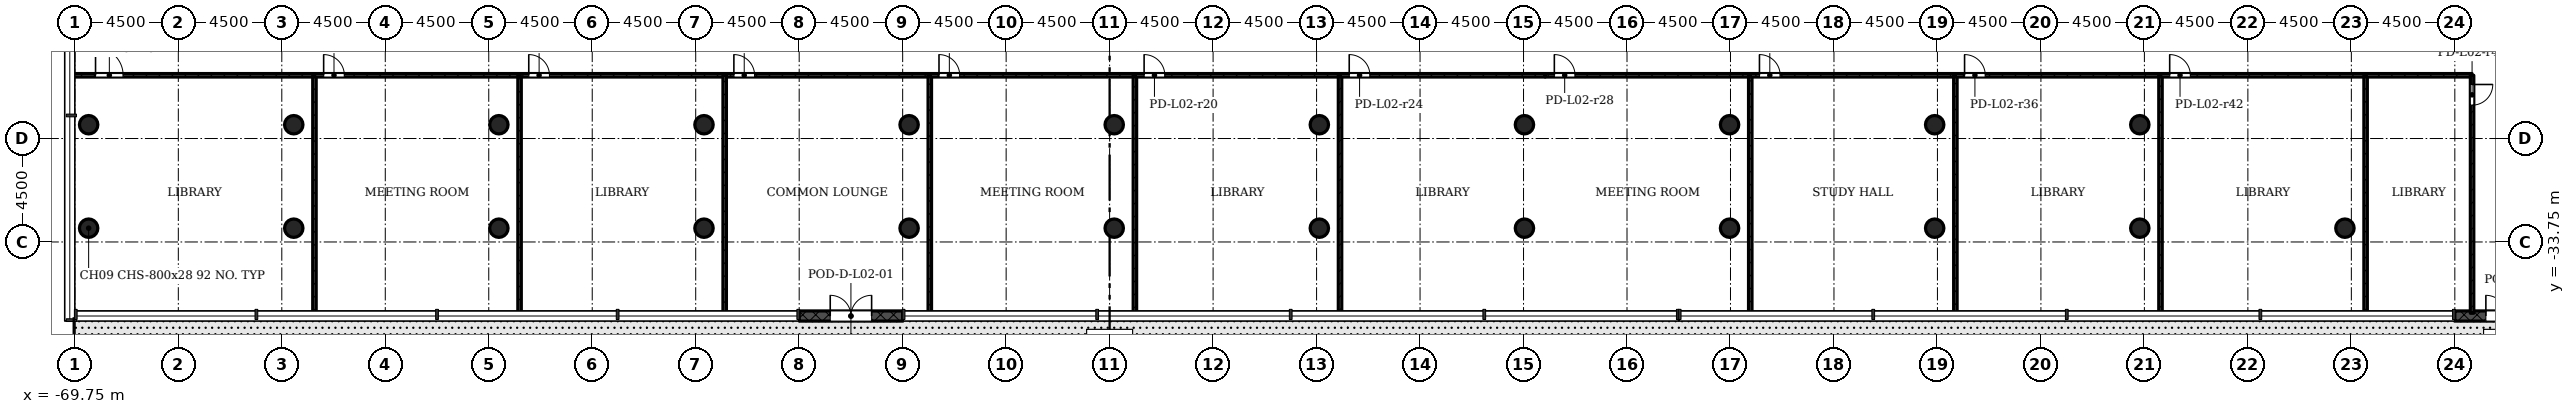
"""IFC4 building model, lengths in metres.
Left out: names, types, materials, properties, quantities, classifications, styles, units other than length and angle.
Written with IfcOpenShell. Run it as: python <this file> out.ifc"""

import sys

from ifc_helpers import new_model, si_unit, direction, frame, frame_2d, origin, origin_2d, place, context, subcontext, project, spatial, rectangle, hollow_circle, extrude, element, fill, save


model = new_model("IFC4")
c1 = context("Model", 3, precision=1e-05, world=origin(), true_north=direction((0.0, 1.0)))
c2 = subcontext(c1, "Body", "Model", "MODEL_VIEW")
j1 = project(units=[si_unit("LENGTHUNIT", "METRE"), si_unit("PLANEANGLEUNIT", "RADIAN")], contexts=[c1])
p1 = place(None, origin())
s1 = spatial("IfcSite", under=j1, at=p1, CompositionType="ELEMENT")
p2 = place(p1, origin())
s2 = spatial("IfcBuilding", under=s1, at=p2, CompositionType="ELEMENT")
p3 = place(p2, frame((0.0, 0.0, 11.0)))
s3 = spatial("IfcBuildingStorey", under=s2, at=p3, CompositionType="ELEMENT", Elevation=11.0)
for number, where, z_axis, x_axis in (
    (1, (-69.15, -33.15, 0.0), (0.0, 0.0, 1.0), (1.0, 0.0, 0.0)),
    (2, (-60.23, -33.15, 0.0), (0.0, 0.0, 1.0), (1.0, 0.0, 0.0)),
    (3, (-51.31, -33.15, 0.0), (0.0, 0.0, 1.0), (1.0, 0.0, 0.0)),
    (4, (-42.39, -33.15, 0.0), (0.0, 0.0, 1.0), (1.0, 0.0, 0.0)),
    (5, (-33.47, -33.15, 0.0), (0.0, 0.0, 1.0), (1.0, 0.0, 0.0)),
    (6, (-24.55, -33.15, 0.0), (0.0, 0.0, 1.0), (1.0, 0.0, 0.0)),
    (7, (-15.63, -33.15, 0.0), (0.0, 0.0, 1.0), (1.0, 0.0, 0.0)),
    (8, (-6.71, -33.15, 0.0), (0.0, 0.0, 1.0), (1.0, 0.0, 0.0)),
    (9, (2.21, -33.15, 0.0), (0.0, 0.0, 1.0), (1.0, 0.0, 0.0)),
    (10, (11.13, -33.15, 0.0), (0.0, 0.0, 1.0), (1.0, 0.0, 0.0)),
    (11, (20.05, -33.15, 0.0), (0.0, 0.0, 1.0), (1.0, 0.0, 0.0)),
    (12, (28.97, -33.15, 0.0), (0.0, 0.0, 1.0), (1.0, 0.0, 0.0)),
    (13, (-69.15, -28.65, 0.0), (0.0, 0.0, 1.0), (1.0, 0.0, 0.0)),
    (14, (-60.23, -28.65, 0.0), (0.0, 0.0, 1.0), (1.0, 0.0, 0.0)),
    (15, (-51.31, -28.65, 0.0), (0.0, 0.0, 1.0), (1.0, 0.0, 0.0)),
    (16, (-42.39, -28.65, 0.0), (0.0, 0.0, 1.0), (1.0, 0.0, 0.0)),
    (17, (-33.47, -28.65, 0.0), (0.0, 0.0, 1.0), (1.0, 0.0, 0.0)),
    (18, (-24.55, -28.65, 0.0), (0.0, 0.0, 1.0), (1.0, 0.0, 0.0)),
    (19, (-15.63, -28.65, 0.0), (0.0, 0.0, 1.0), (1.0, 0.0, 0.0)),
    (20, (-6.71, -28.65, 0.0), (0.0, 0.0, 1.0), (1.0, 0.0, 0.0)),
    (21, (2.21, -28.65, 0.0), (0.0, 0.0, 1.0), (1.0, 0.0, 0.0)),
    (22, (11.13, -28.65, 0.0), (0.0, 0.0, 1.0), (1.0, 0.0, 0.0)),
    (23, (20.05, -28.65, 0.0), (0.0, 0.0, 1.0), (1.0, 0.0, 0.0)),
):
    element("IfcColumn", number, at=place(p3, frame(where, z_axis=z_axis, x_axis=x_axis)), inside=s3, PredefinedType="COLUMN", context=c2, shape_type="SweptSolid", body=[
        extrude(hollow_circle(Radius=0.4, WallThickness=0.028, at=origin_2d()), origin(), (0.0, 0.0, 1.0), 4.5),
    ])
p4 = place(p3, frame((-38.25, -36.97, -0.02), z_axis=(0.0, 0.0, 1.0), x_axis=(1.0, 0.0, 0.0)))
e24 = element("IfcWall", 24, at=p4, inside=s3, PredefinedType="STANDARD", context=c2, shape_type="SweptSolid", body=[
    extrude(rectangle(XDim=4.5, YDim=0.44, at=frame_2d((2.25, 0.0))), origin(), (0.0, 0.0, 1.0), 4.22),
])
p5 = place(p4, frame((1.35, 0.0, 0.02)))
e25 = element("IfcOpeningElement", 25, at=p5, cuts=e24, PredefinedType="OPENING", context=c2, shape_type="SweptSolid", body=[
    extrude(rectangle(XDim=1.8, YDim=2.1, at=frame_2d((0.9, 1.05))), frame((0.0, 0.23, 0.0), z_axis=(0.0, -1.0, 0.0), x_axis=(1.0, 0.0, 0.0)), (0.0, 0.0, 1.0), 0.46),
])
p6 = place(p3, frame((33.75, -36.97, -0.02), z_axis=(0.0, 0.0, 1.0), x_axis=(1.0, 0.0, 0.0)))
e26 = element("IfcWall", 26, at=p6, inside=s3, PredefinedType="STANDARD", context=c2, shape_type="SweptSolid", body=[
    extrude(rectangle(XDim=4.5, YDim=0.44, at=frame_2d((2.25, 0.0))), origin(), (0.0, 0.0, 1.0), 4.22),
])
p7 = place(p6, frame((1.35, 0.0, 0.02)))
e27 = element("IfcOpeningElement", 27, at=p7, cuts=e26, PredefinedType="OPENING", context=c2, shape_type="SweptSolid", body=[
    extrude(rectangle(XDim=1.8, YDim=2.1, at=frame_2d((0.9, 1.05))), frame((0.0, 0.23, 0.0), z_axis=(0.0, -1.0, 0.0), x_axis=(1.0, 0.0, 0.0)), (0.0, 0.0, 1.0), 0.46),
])
p8 = place(p3, frame((-69.85, -26.5, 0.0), z_axis=(0.0, 0.0, 1.0), x_axis=(1.0, 0.0, 0.0)))
e28 = element("IfcWall", 28, at=p8, inside=s3, PredefinedType="PARTITIONING", context=c2, shape_type="SweptSolid", body=[
    extrude(rectangle(XDim=10.52, YDim=0.15, at=frame_2d((5.26, 0.0))), origin(), (0.0, 0.0, 1.0), 4.08),
])
p9 = place(p8, frame((1.0, 0.0, 0.0)))
e29 = element("IfcOpeningElement", 29, at=p9, cuts=e28, PredefinedType="OPENING", context=c2, shape_type="SweptSolid", body=[
    extrude(rectangle(XDim=1.2, YDim=2.1, at=frame_2d((0.6, 1.05))), frame((0.0, 0.085, 0.0), z_axis=(0.0, -1.0, 0.0), x_axis=(1.0, 0.0, 0.0)), (0.0, 0.0, 1.0), 0.17),
])
p10 = place(p3, frame((-59.33, -26.5, 0.0), z_axis=(0.0, 0.0, 1.0), x_axis=(0.0, -1.0, 0.0)))
e30 = element("IfcWall", 30, at=p10, inside=s3, PredefinedType="PARTITIONING", context=c2, shape_type="SweptSolid", body=[
    extrude(rectangle(XDim=10.35, YDim=0.15, at=frame_2d((5.175, 0.0))), origin(), (0.0, 0.0, 1.0), 4.08),
])
p11 = place(p3, frame((-59.33, -26.5, 0.0), z_axis=(0.0, 0.0, 1.0), x_axis=(1.0, 0.0, 0.0)))
e31 = element("IfcWall", 31, at=p11, inside=s3, PredefinedType="PARTITIONING", context=c2, shape_type="SweptSolid", body=[
    extrude(rectangle(XDim=8.92, YDim=0.15, at=frame_2d((4.46, 0.0))), origin(), (0.0, 0.0, 1.0), 4.08),
])
p12 = place(p11, frame((0.4, 0.0, 0.0)))
e32 = element("IfcOpeningElement", 32, at=p12, cuts=e31, PredefinedType="OPENING", context=c2, shape_type="SweptSolid", body=[
    extrude(rectangle(XDim=0.9, YDim=2.1, at=frame_2d((0.45, 1.05))), frame((0.0, 0.085, 0.0), z_axis=(0.0, -1.0, 0.0), x_axis=(1.0, 0.0, 0.0)), (0.0, 0.0, 1.0), 0.17),
])
p13 = place(p3, frame((-50.41, -26.5, 0.0), z_axis=(0.0, 0.0, 1.0), x_axis=(0.0, -1.0, 0.0)))
e33 = element("IfcWall", 33, at=p13, inside=s3, PredefinedType="PARTITIONING", context=c2, shape_type="SweptSolid", body=[
    extrude(rectangle(XDim=10.35, YDim=0.15, at=frame_2d((5.175, 0.0))), origin(), (0.0, 0.0, 1.0), 4.08),
])
p14 = place(p3, frame((-50.41, -26.5, 0.0), z_axis=(0.0, 0.0, 1.0), x_axis=(1.0, 0.0, 0.0)))
e34 = element("IfcWall", 34, at=p14, inside=s3, PredefinedType="PARTITIONING", context=c2, shape_type="SweptSolid", body=[
    extrude(rectangle(XDim=8.92, YDim=0.15, at=frame_2d((4.46, 0.0))), origin(), (0.0, 0.0, 1.0), 4.08),
])
p15 = place(p14, frame((0.4, 0.0, 0.0)))
e35 = element("IfcOpeningElement", 35, at=p15, cuts=e34, PredefinedType="OPENING", context=c2, shape_type="SweptSolid", body=[
    extrude(rectangle(XDim=0.9, YDim=2.1, at=frame_2d((0.45, 1.05))), frame((0.0, 0.085, 0.0), z_axis=(0.0, -1.0, 0.0), x_axis=(1.0, 0.0, 0.0)), (0.0, 0.0, 1.0), 0.17),
])
p16 = place(p3, frame((-41.49, -26.5, 0.0), z_axis=(0.0, 0.0, 1.0), x_axis=(1.0, 0.0, 0.0)))
e36 = element("IfcWall", 36, at=p16, inside=s3, PredefinedType="PARTITIONING", context=c2, shape_type="SweptSolid", body=[
    extrude(rectangle(XDim=8.92, YDim=0.15, at=frame_2d((4.46, 0.0))), origin(), (0.0, 0.0, 1.0), 4.08),
])
p17 = place(p16, frame((0.4, 0.0, 0.0)))
e37 = element("IfcOpeningElement", 37, at=p17, cuts=e36, PredefinedType="OPENING", context=c2, shape_type="SweptSolid", body=[
    extrude(rectangle(XDim=0.9, YDim=2.1, at=frame_2d((0.45, 1.05))), frame((0.0, 0.085, 0.0), z_axis=(0.0, -1.0, 0.0), x_axis=(1.0, 0.0, 0.0)), (0.0, 0.0, 1.0), 0.17),
])
for number, where, z_axis, x_axis in (
    (38, (-41.49, -36.85, 0.0), (0.0, 0.0, 1.0), (0.0, 1.0, 0.0)),
    (39, (-32.57, -26.5, 0.0), (0.0, 0.0, 1.0), (0.0, -1.0, 0.0)),
):
    element("IfcWall", number, at=place(p3, frame(where, z_axis=z_axis, x_axis=x_axis)), inside=s3, PredefinedType="PARTITIONING", context=c2, shape_type="SweptSolid", body=[
        extrude(rectangle(XDim=10.35, YDim=0.15, at=frame_2d((5.175, 0.0))), origin(), (0.0, 0.0, 1.0), 4.08),
    ])
p18 = place(p3, frame((-32.57, -26.5, 0.0), z_axis=(0.0, 0.0, 1.0), x_axis=(1.0, 0.0, 0.0)))
e40 = element("IfcWall", 40, at=p18, inside=s3, PredefinedType="PARTITIONING", context=c2, shape_type="SweptSolid", body=[
    extrude(rectangle(XDim=8.92, YDim=0.15, at=frame_2d((4.46, 0.0))), origin(), (0.0, 0.0, 1.0), 4.08),
])
p19 = place(p18, frame((0.4, 0.0, 0.0)))
e41 = element("IfcOpeningElement", 41, at=p19, cuts=e40, PredefinedType="OPENING", context=c2, shape_type="SweptSolid", body=[
    extrude(rectangle(XDim=0.9, YDim=2.1, at=frame_2d((0.45, 1.05))), frame((0.0, 0.085, 0.0), z_axis=(0.0, -1.0, 0.0), x_axis=(1.0, 0.0, 0.0)), (0.0, 0.0, 1.0), 0.17),
])
p20 = place(p3, frame((-23.65, -26.5, 0.0), z_axis=(0.0, 0.0, 1.0), x_axis=(0.0, -1.0, 0.0)))
e42 = element("IfcWall", 42, at=p20, inside=s3, PredefinedType="PARTITIONING", context=c2, shape_type="SweptSolid", body=[
    extrude(rectangle(XDim=10.35, YDim=0.15, at=frame_2d((5.175, 0.0))), origin(), (0.0, 0.0, 1.0), 4.08),
])
p21 = place(p3, frame((-23.65, -26.5, 0.0), z_axis=(0.0, 0.0, 1.0), x_axis=(1.0, 0.0, 0.0)))
e43 = element("IfcWall", 43, at=p21, inside=s3, PredefinedType="PARTITIONING", context=c2, shape_type="SweptSolid", body=[
    extrude(rectangle(XDim=8.92, YDim=0.15, at=frame_2d((4.46, 0.0))), origin(), (0.0, 0.0, 1.0), 4.08),
])
p22 = place(p21, frame((0.4, 0.0, 0.0)))
e44 = element("IfcOpeningElement", 44, at=p22, cuts=e43, PredefinedType="OPENING", context=c2, shape_type="SweptSolid", body=[
    extrude(rectangle(XDim=0.9, YDim=2.1, at=frame_2d((0.45, 1.05))), frame((0.0, 0.085, 0.0), z_axis=(0.0, -1.0, 0.0), x_axis=(1.0, 0.0, 0.0)), (0.0, 0.0, 1.0), 0.17),
])
p23 = place(p3, frame((-14.73, -26.5, 0.0), z_axis=(0.0, 0.0, 1.0), x_axis=(0.0, -1.0, 0.0)))
e45 = element("IfcWall", 45, at=p23, inside=s3, PredefinedType="PARTITIONING", context=c2, shape_type="SweptSolid", body=[
    extrude(rectangle(XDim=10.35, YDim=0.15, at=frame_2d((5.175, 0.0))), origin(), (0.0, 0.0, 1.0), 4.08),
])
p24 = place(p3, frame((-14.73, -26.5, 0.0), z_axis=(0.0, 0.0, 1.0), x_axis=(1.0, 0.0, 0.0)))
e46 = element("IfcWall", 46, at=p24, inside=s3, PredefinedType="PARTITIONING", context=c2, shape_type="SweptSolid", body=[
    extrude(rectangle(XDim=8.92, YDim=0.15, at=frame_2d((4.46, 0.0))), origin(), (0.0, 0.0, 1.0), 4.08),
])
p25 = place(p24, frame((0.4, 0.0, 0.0)))
e47 = element("IfcOpeningElement", 47, at=p25, cuts=e46, PredefinedType="OPENING", context=c2, shape_type="SweptSolid", body=[
    extrude(rectangle(XDim=0.9, YDim=2.1, at=frame_2d((0.45, 1.05))), frame((0.0, 0.085, 0.0), z_axis=(0.0, -1.0, 0.0), x_axis=(1.0, 0.0, 0.0)), (0.0, 0.0, 1.0), 0.17),
])
p26 = place(p3, frame((-5.81, -26.5, 0.0), z_axis=(0.0, 0.0, 1.0), x_axis=(1.0, 0.0, 0.0)))
e48 = element("IfcWall", 48, at=p26, inside=s3, PredefinedType="PARTITIONING", context=c2, shape_type="SweptSolid", body=[
    extrude(rectangle(XDim=8.92, YDim=0.15, at=frame_2d((4.46, 0.0))), origin(), (0.0, 0.0, 1.0), 4.08),
])
p27 = place(p26, frame((0.4, 0.0, 0.0)))
e49 = element("IfcOpeningElement", 49, at=p27, cuts=e48, PredefinedType="OPENING", context=c2, shape_type="SweptSolid", body=[
    extrude(rectangle(XDim=0.9, YDim=2.1, at=frame_2d((0.45, 1.05))), frame((0.0, 0.085, 0.0), z_axis=(0.0, -1.0, 0.0), x_axis=(1.0, 0.0, 0.0)), (0.0, 0.0, 1.0), 0.17),
])
p28 = place(p3, frame((3.11, -26.5, 0.0), z_axis=(0.0, 0.0, 1.0), x_axis=(0.0, -1.0, 0.0)))
e50 = element("IfcWall", 50, at=p28, inside=s3, PredefinedType="PARTITIONING", context=c2, shape_type="SweptSolid", body=[
    extrude(rectangle(XDim=10.35, YDim=0.15, at=frame_2d((5.175, 0.0))), origin(), (0.0, 0.0, 1.0), 4.08),
])
p29 = place(p3, frame((3.11, -26.5, 0.0), z_axis=(0.0, 0.0, 1.0), x_axis=(1.0, 0.0, 0.0)))
e51 = element("IfcWall", 51, at=p29, inside=s3, PredefinedType="PARTITIONING", context=c2, shape_type="SweptSolid", body=[
    extrude(rectangle(XDim=8.92, YDim=0.15, at=frame_2d((4.46, 0.0))), origin(), (0.0, 0.0, 1.0), 4.08),
])
p30 = place(p29, frame((0.4, 0.0, 0.0)))
e52 = element("IfcOpeningElement", 52, at=p30, cuts=e51, PredefinedType="OPENING", context=c2, shape_type="SweptSolid", body=[
    extrude(rectangle(XDim=0.9, YDim=2.1, at=frame_2d((0.45, 1.05))), frame((0.0, 0.085, 0.0), z_axis=(0.0, -1.0, 0.0), x_axis=(1.0, 0.0, 0.0)), (0.0, 0.0, 1.0), 0.17),
])
p31 = place(p3, frame((12.03, -26.5, 0.0), z_axis=(0.0, 0.0, 1.0), x_axis=(0.0, -1.0, 0.0)))
e53 = element("IfcWall", 53, at=p31, inside=s3, PredefinedType="PARTITIONING", context=c2, shape_type="SweptSolid", body=[
    extrude(rectangle(XDim=10.35, YDim=0.15, at=frame_2d((5.175, 0.0))), origin(), (0.0, 0.0, 1.0), 4.08),
])
p32 = place(p3, frame((12.03, -26.5, 0.0), z_axis=(0.0, 0.0, 1.0), x_axis=(1.0, 0.0, 0.0)))
e54 = element("IfcWall", 54, at=p32, inside=s3, PredefinedType="PARTITIONING", context=c2, shape_type="SweptSolid", body=[
    extrude(rectangle(XDim=8.92, YDim=0.15, at=frame_2d((4.46, 0.0))), origin(), (0.0, 0.0, 1.0), 4.08),
])
p33 = place(p32, frame((0.4, 0.0, 0.0)))
e55 = element("IfcOpeningElement", 55, at=p33, cuts=e54, PredefinedType="OPENING", context=c2, shape_type="SweptSolid", body=[
    extrude(rectangle(XDim=0.9, YDim=2.1, at=frame_2d((0.45, 1.05))), frame((0.0, 0.085, 0.0), z_axis=(0.0, -1.0, 0.0), x_axis=(1.0, 0.0, 0.0)), (0.0, 0.0, 1.0), 0.17),
])
p34 = place(p3, frame((20.95, -26.5, 0.0), z_axis=(0.0, 0.0, 1.0), x_axis=(0.0, -1.0, 0.0)))
e56 = element("IfcWall", 56, at=p34, inside=s3, PredefinedType="PARTITIONING", context=c2, shape_type="SweptSolid", body=[
    extrude(rectangle(XDim=10.35, YDim=0.15, at=frame_2d((5.175, 0.0))), origin(), (0.0, 0.0, 1.0), 4.08),
])
p35 = place(p3, frame((20.95, -26.5, 0.0), z_axis=(0.0, 0.0, 1.0), x_axis=(1.0, 0.0, 0.0)))
e57 = element("IfcWall", 57, at=p35, inside=s3, PredefinedType="PARTITIONING", context=c2, shape_type="SweptSolid", body=[
    extrude(rectangle(XDim=8.92, YDim=0.15, at=frame_2d((4.46, 0.0))), origin(), (0.0, 0.0, 1.0), 4.08),
])
p36 = place(p35, frame((0.4, 0.0, 0.0)))
e58 = element("IfcOpeningElement", 58, at=p36, cuts=e57, PredefinedType="OPENING", context=c2, shape_type="SweptSolid", body=[
    extrude(rectangle(XDim=0.9, YDim=2.1, at=frame_2d((0.45, 1.05))), frame((0.0, 0.085, 0.0), z_axis=(0.0, -1.0, 0.0), x_axis=(1.0, 0.0, 0.0)), (0.0, 0.0, 1.0), 0.17),
])
p37 = place(p3, frame((29.87, -26.5, 0.0), z_axis=(0.0, 0.0, 1.0), x_axis=(0.0, -1.0, 0.0)))
e59 = element("IfcWall", 59, at=p37, inside=s3, PredefinedType="PARTITIONING", context=c2, shape_type="SweptSolid", body=[
    extrude(rectangle(XDim=10.35, YDim=0.15, at=frame_2d((5.175, 0.0))), origin(), (0.0, 0.0, 1.0), 4.08),
])
p38 = place(p3, frame((29.87, -26.5, 0.0), z_axis=(0.0, 0.0, 1.0), x_axis=(1.0, 0.0, 0.0)))
e60 = element("IfcWall", 60, at=p38, inside=s3, PredefinedType="PARTITIONING", context=c2, shape_type="SweptSolid", body=[
    extrude(rectangle(XDim=4.63, YDim=0.15, at=frame_2d((2.315, 0.0))), origin(), (0.0, 0.0, 1.0), 4.08),
])
p39 = place(p3, frame((34.5, -26.5, 0.0), z_axis=(0.0, 0.0, 1.0), x_axis=(0.0, -1.0, 0.0)))
e61 = element("IfcWall", 61, at=p39, inside=s3, PredefinedType="PARTITIONING", context=c2, shape_type="SweptSolid", body=[
    extrude(rectangle(XDim=10.35, YDim=0.15, at=frame_2d((5.175, 0.0))), origin(), (0.0, 0.0, 1.0), 4.08),
])
p40 = place(p39, frame((0.4, 0.0, 0.0)))
e62 = element("IfcOpeningElement", 62, at=p40, cuts=e61, PredefinedType="OPENING", context=c2, shape_type="SweptSolid", body=[
    extrude(rectangle(XDim=0.9, YDim=2.1, at=frame_2d((0.45, 1.05))), frame((0.0, 0.085, 0.0), z_axis=(0.0, -1.0, 0.0), x_axis=(1.0, 0.0, 0.0)), (0.0, 0.0, 1.0), 0.17),
])
p41 = place(p5, origin())
e63 = element("IfcDoor", 63, at=p41, inside=s3, OperationType="DOUBLE_DOOR_SINGLE_SWING", PredefinedType="DOOR", context=c2, shape_type="SweptSolid", body=[
    extrude(rectangle(XDim=1.8, YDim=2.1, at=frame_2d((0.9, 1.05))), frame((0.0, 0.025, 0.0), z_axis=(0.0, -1.0, 0.0), x_axis=(1.0, 0.0, 0.0)), (0.0, 0.0, 1.0), 0.05),
])
fill(e25, e63)
p42 = place(p7, origin())
e64 = element("IfcDoor", 64, at=p42, inside=s3, OperationType="DOUBLE_DOOR_SINGLE_SWING", PredefinedType="DOOR", context=c2, shape_type="SweptSolid", body=[
    extrude(rectangle(XDim=1.8, YDim=2.1, at=frame_2d((0.9, 1.05))), frame((0.0, 0.025, 0.0), z_axis=(0.0, -1.0, 0.0), x_axis=(1.0, 0.0, 0.0)), (0.0, 0.0, 1.0), 0.05),
])
fill(e27, e64)
p43 = place(p9, origin())
e65 = element("IfcDoor", 65, at=p43, inside=s3, OperationType="SINGLE_SWING_RIGHT", PredefinedType="DOOR", context=c2, shape_type="SweptSolid", body=[
    extrude(rectangle(XDim=1.2, YDim=2.1, at=frame_2d((0.6, 1.05))), frame((0.0, 0.025, 0.0), z_axis=(0.0, -1.0, 0.0), x_axis=(1.0, 0.0, 0.0)), (0.0, 0.0, 1.0), 0.05),
])
fill(e29, e65)
p44 = place(p12, origin())
e66 = element("IfcDoor", 66, at=p44, inside=s3, OperationType="SINGLE_SWING_RIGHT", PredefinedType="DOOR", context=c2, shape_type="SweptSolid", body=[
    extrude(rectangle(XDim=0.9, YDim=2.1, at=frame_2d((0.45, 1.05))), frame((0.0, 0.025, 0.0), z_axis=(0.0, -1.0, 0.0), x_axis=(1.0, 0.0, 0.0)), (0.0, 0.0, 1.0), 0.05),
])
fill(e32, e66)
p45 = place(p15, origin())
e67 = element("IfcDoor", 67, at=p45, inside=s3, OperationType="SINGLE_SWING_RIGHT", PredefinedType="DOOR", context=c2, shape_type="SweptSolid", body=[
    extrude(rectangle(XDim=0.9, YDim=2.1, at=frame_2d((0.45, 1.05))), frame((0.0, 0.025, 0.0), z_axis=(0.0, -1.0, 0.0), x_axis=(1.0, 0.0, 0.0)), (0.0, 0.0, 1.0), 0.05),
])
fill(e35, e67)
p46 = place(p17, origin())
e68 = element("IfcDoor", 68, at=p46, inside=s3, OperationType="SINGLE_SWING_RIGHT", PredefinedType="DOOR", context=c2, shape_type="SweptSolid", body=[
    extrude(rectangle(XDim=0.9, YDim=2.1, at=frame_2d((0.45, 1.05))), frame((0.0, 0.025, 0.0), z_axis=(0.0, -1.0, 0.0), x_axis=(1.0, 0.0, 0.0)), (0.0, 0.0, 1.0), 0.05),
])
fill(e37, e68)
p47 = place(p19, origin())
e69 = element("IfcDoor", 69, at=p47, inside=s3, OperationType="SINGLE_SWING_RIGHT", PredefinedType="DOOR", context=c2, shape_type="SweptSolid", body=[
    extrude(rectangle(XDim=0.9, YDim=2.1, at=frame_2d((0.45, 1.05))), frame((0.0, 0.025, 0.0), z_axis=(0.0, -1.0, 0.0), x_axis=(1.0, 0.0, 0.0)), (0.0, 0.0, 1.0), 0.05),
])
fill(e41, e69)
p48 = place(p22, origin())
e70 = element("IfcDoor", 70, at=p48, inside=s3, OperationType="SINGLE_SWING_RIGHT", PredefinedType="DOOR", context=c2, shape_type="SweptSolid", body=[
    extrude(rectangle(XDim=0.9, YDim=2.1, at=frame_2d((0.45, 1.05))), frame((0.0, 0.025, 0.0), z_axis=(0.0, -1.0, 0.0), x_axis=(1.0, 0.0, 0.0)), (0.0, 0.0, 1.0), 0.05),
])
fill(e44, e70)
p49 = place(p25, origin())
e71 = element("IfcDoor", 71, at=p49, inside=s3, OperationType="SINGLE_SWING_RIGHT", PredefinedType="DOOR", context=c2, shape_type="SweptSolid", body=[
    extrude(rectangle(XDim=0.9, YDim=2.1, at=frame_2d((0.45, 1.05))), frame((0.0, 0.025, 0.0), z_axis=(0.0, -1.0, 0.0), x_axis=(1.0, 0.0, 0.0)), (0.0, 0.0, 1.0), 0.05),
])
fill(e47, e71)
p50 = place(p27, origin())
e72 = element("IfcDoor", 72, at=p50, inside=s3, OperationType="SINGLE_SWING_RIGHT", PredefinedType="DOOR", context=c2, shape_type="SweptSolid", body=[
    extrude(rectangle(XDim=0.9, YDim=2.1, at=frame_2d((0.45, 1.05))), frame((0.0, 0.025, 0.0), z_axis=(0.0, -1.0, 0.0), x_axis=(1.0, 0.0, 0.0)), (0.0, 0.0, 1.0), 0.05),
])
fill(e49, e72)
p51 = place(p30, origin())
e73 = element("IfcDoor", 73, at=p51, inside=s3, OperationType="SINGLE_SWING_RIGHT", PredefinedType="DOOR", context=c2, shape_type="SweptSolid", body=[
    extrude(rectangle(XDim=0.9, YDim=2.1, at=frame_2d((0.45, 1.05))), frame((0.0, 0.025, 0.0), z_axis=(0.0, -1.0, 0.0), x_axis=(1.0, 0.0, 0.0)), (0.0, 0.0, 1.0), 0.05),
])
fill(e52, e73)
p52 = place(p33, origin())
e74 = element("IfcDoor", 74, at=p52, inside=s3, OperationType="SINGLE_SWING_RIGHT", PredefinedType="DOOR", context=c2, shape_type="SweptSolid", body=[
    extrude(rectangle(XDim=0.9, YDim=2.1, at=frame_2d((0.45, 1.05))), frame((0.0, 0.025, 0.0), z_axis=(0.0, -1.0, 0.0), x_axis=(1.0, 0.0, 0.0)), (0.0, 0.0, 1.0), 0.05),
])
fill(e55, e74)
p53 = place(p36, origin())
e75 = element("IfcDoor", 75, at=p53, inside=s3, OperationType="SINGLE_SWING_RIGHT", PredefinedType="DOOR", context=c2, shape_type="SweptSolid", body=[
    extrude(rectangle(XDim=0.9, YDim=2.1, at=frame_2d((0.45, 1.05))), frame((0.0, 0.025, 0.0), z_axis=(0.0, -1.0, 0.0), x_axis=(1.0, 0.0, 0.0)), (0.0, 0.0, 1.0), 0.05),
])
fill(e58, e75)
p54 = place(p40, origin())
e76 = element("IfcDoor", 76, at=p54, inside=s3, OperationType="SINGLE_SWING_RIGHT", PredefinedType="DOOR", context=c2, shape_type="SweptSolid", body=[
    extrude(rectangle(XDim=0.9, YDim=2.1, at=frame_2d((0.45, 1.05))), frame((0.0, 0.025, 0.0), z_axis=(0.0, -1.0, 0.0), x_axis=(1.0, 0.0, 0.0)), (0.0, 0.0, 1.0), 0.05),
])
fill(e62, e76)
save(model, sys.argv[1])
